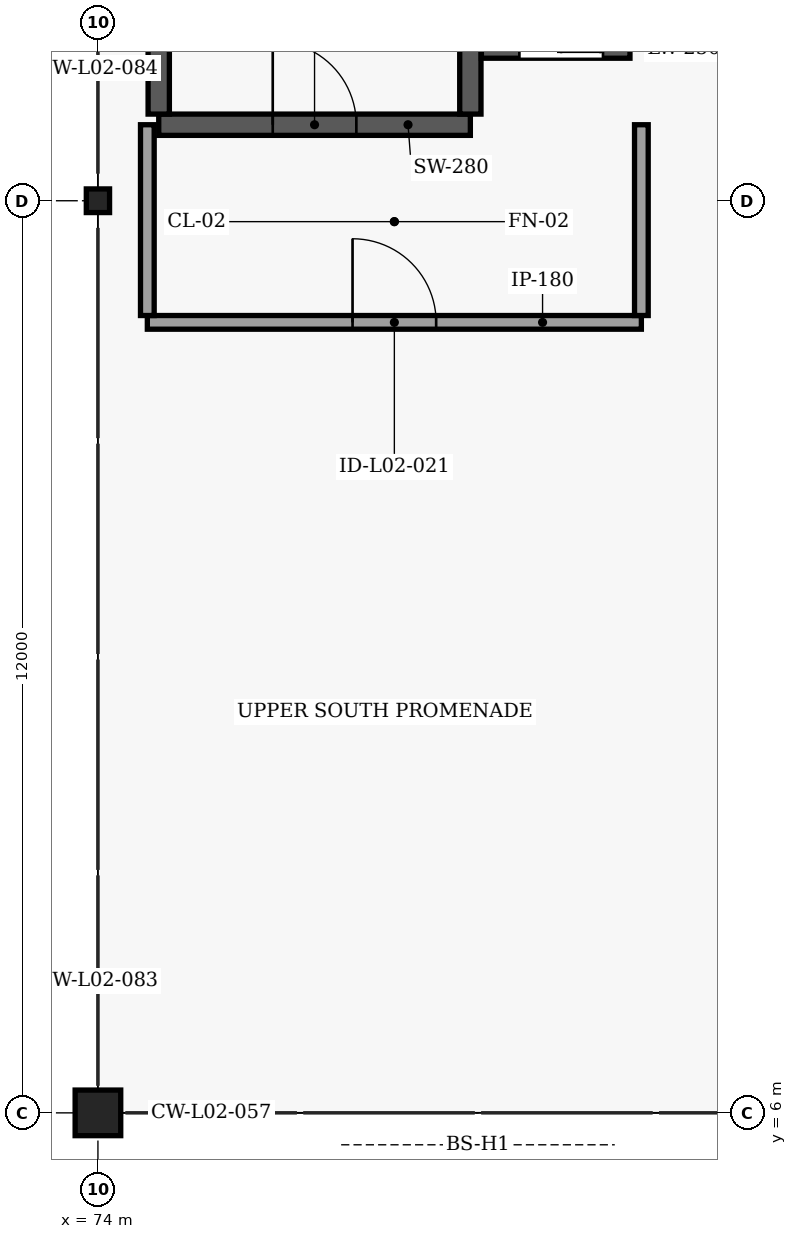
"""IFC4 building model, lengths in metres.
Left out: names, types, materials, properties, quantities, classifications, styles, units other than length and angle.
Written with IfcOpenShell. Run it as: python <this file> out.ifc"""

import sys

from ifc_helpers import new_model, si_unit, direction, frame, frame_2d, origin, origin_2d, place, context, subcontext, project, spatial, rectangle, i_section, extrude, element, fill, save


model = new_model("IFC4")
c1 = context("Model", 3, precision=1e-05, world=origin(), true_north=direction((0.0, 1.0)))
c2 = subcontext(c1, "Body", "Model", "MODEL_VIEW")
j1 = project(units=[si_unit("LENGTHUNIT", "METRE"), si_unit("PLANEANGLEUNIT", "RADIAN")], contexts=[c1])
p1 = place(None, origin())
s1 = spatial("IfcSite", under=j1, at=p1, CompositionType="ELEMENT")
p2 = place(p1, origin())
s2 = spatial("IfcBuilding", under=s1, at=p2, CompositionType="ELEMENT")
p3 = place(p2, frame((0.0, 0.0, 5.4)))
s3 = spatial("IfcBuildingStorey", under=s2, at=p3, CompositionType="ELEMENT", Elevation=5.4)
p4 = place(p3, frame((74.0, 6.0, 0.0), z_axis=(0.0, 0.0, 1.0), x_axis=(1.0, 0.0, 0.0)))
e1 = element("IfcColumn", 1, at=p4, inside=s3, PredefinedType="COLUMN", context=c2, shape_type="SweptSolid", body=[
    extrude(rectangle(XDim=0.6, YDim=0.6, at=origin_2d()), origin(), (0.0, 0.0, 1.0), 4.54),
])
p5 = place(p3, frame((74.0, 18.0, 0.0), z_axis=(0.0, 0.0, 1.0), x_axis=(1.0, 0.0, 0.0)))
e2 = element("IfcColumn", 2, at=p5, inside=s3, PredefinedType="COLUMN", context=c2, shape_type="SweptSolid", body=[
    extrude(i_section(OverallWidth=0.306, OverallDepth=0.311, WebThickness=0.011, FlangeThickness=0.017, FilletRadius=0.015, at=origin_2d()), origin(), (0.0, 0.0, 1.0), 4.5),
])
p6 = place(p3, frame((74.8, 19.0, 0.0), z_axis=(0.0, 0.0, 1.0), x_axis=(1.0, 0.0, 0.0)))
e3 = element("IfcWall", 3, at=p6, inside=s3, PredefinedType="SHEAR", context=c2, shape_type="SweptSolid", body=[
    extrude(rectangle(XDim=4.1, YDim=0.28, at=frame_2d((2.05, 0.0))), origin(), (0.0, 0.0, 1.0), 4.54),
])
p7 = place(p6, frame((1.5, 0.0, 0.0)))
e4 = element("IfcOpeningElement", 4, at=p7, cuts=e3, PredefinedType="OPENING", context=c2, shape_type="SweptSolid", body=[
    extrude(rectangle(XDim=1.1, YDim=2.2, at=frame_2d((0.55, 1.1))), frame((0.0, 0.15, 0.0), z_axis=(0.0, -1.0, 0.0), x_axis=(1.0, 0.0, 0.0)), (0.0, 0.0, 1.0), 0.3),
])
for number, where, z_axis, x_axis in (
    (5, (74.8, 19.14, 0.0), (0.0, 0.0, 1.0), (0.0, 1.0, 0.0)),
    (6, (78.9, 19.14, 0.0), (0.0, 0.0, 1.0), (0.0, 1.0, 0.0)),
):
    element("IfcWall", number, at=place(p3, frame(where, z_axis=z_axis, x_axis=x_axis)), inside=s3, PredefinedType="SHEAR", context=c2, shape_type="SweptSolid", body=[
        extrude(rectangle(XDim=8.72, YDim=0.28, at=frame_2d((4.36, 0.0))), origin(), (0.0, 0.0, 1.0), 4.54),
    ])
p8 = place(p3, frame((79.045, 20.0, 0.0), z_axis=(0.0, 0.0, 1.0), x_axis=(1.0, 0.0, 0.0)))
e7 = element("IfcWall", 7, at=p8, inside=s3, PredefinedType="SOLIDWALL", context=c2, shape_type="SweptSolid", body=[
    extrude(rectangle(XDim=1.955, YDim=0.25, at=frame_2d((0.978, 0.0))), origin(), (0.0, 0.0, 1.0), 4.54),
])
p9 = place(p8, frame((0.5, 0.0, 0.0)))
e8 = element("IfcOpeningElement", 8, at=p9, cuts=e7, PredefinedType="OPENING", context=c2, shape_type="SweptSolid", body=[
    extrude(rectangle(XDim=1.1, YDim=2.2, at=frame_2d((0.55, 1.1))), frame((0.0, 0.135, 0.0), z_axis=(0.0, -1.0, 0.0), x_axis=(1.0, 0.0, 0.0)), (0.0, 0.0, 1.0), 0.27),
])
p10 = place(p3, frame((74.65, 16.4, 0.0), z_axis=(0.0, 0.0, 1.0), x_axis=(1.0, 0.0, 0.0)))
e9 = element("IfcWall", 9, at=p10, inside=s3, PredefinedType="SOLIDWALL", context=c2, shape_type="SweptSolid", body=[
    extrude(rectangle(XDim=6.5, YDim=0.18, at=frame_2d((3.25, 0.0))), origin(), (0.0, 0.0, 1.0), 4.5),
])
p11 = place(p10, frame((2.7, 0.0, 0.0)))
e10 = element("IfcOpeningElement", 10, at=p11, cuts=e9, PredefinedType="OPENING", context=c2, shape_type="SweptSolid", body=[
    extrude(rectangle(XDim=1.1, YDim=2.2, at=frame_2d((0.55, 1.1))), frame((0.0, 0.1, 0.0), z_axis=(0.0, -1.0, 0.0), x_axis=(1.0, 0.0, 0.0)), (0.0, 0.0, 1.0), 0.2),
])
for number, where, z_axis, x_axis in (
    (11, (74.65, 16.49, 0.0), (0.0, 0.0, 1.0), (0.0, 1.0, 0.0)),
    (12, (81.15, 16.49, 0.0), (0.0, 0.0, 1.0), (0.0, 1.0, 0.0)),
):
    element("IfcWall", number, at=place(p3, frame(where, z_axis=z_axis, x_axis=x_axis)), inside=s3, PredefinedType="SOLIDWALL", context=c2, shape_type="SweptSolid", body=[
        extrude(rectangle(XDim=2.51, YDim=0.18, at=frame_2d((1.255, 0.0))), origin(), (0.0, 0.0, 1.0), 4.123),
    ])
p12 = place(p7, origin())
e13 = element("IfcDoor", 13, at=p12, inside=s3, OperationType="SINGLE_SWING_LEFT", PredefinedType="DOOR", context=c2, shape_type="SweptSolid", body=[
    extrude(rectangle(XDim=1.1, YDim=2.2, at=frame_2d((0.55, 1.1))), frame((0.0, 0.025, 0.0), z_axis=(0.0, -1.0, 0.0), x_axis=(1.0, 0.0, 0.0)), (0.0, 0.0, 1.0), 0.05),
])
fill(e4, e13)
p13 = place(p11, origin())
e14 = element("IfcDoor", 14, at=p13, inside=s3, OperationType="SINGLE_SWING_LEFT", PredefinedType="DOOR", context=c2, shape_type="SweptSolid", body=[
    extrude(rectangle(XDim=1.1, YDim=2.2, at=frame_2d((0.55, 1.1))), frame((0.0, 0.025, 0.0), z_axis=(0.0, -1.0, 0.0), x_axis=(1.0, 0.0, 0.0)), (0.0, 0.0, 1.0), 0.05),
])
fill(e10, e14)
save(model, sys.argv[1])
